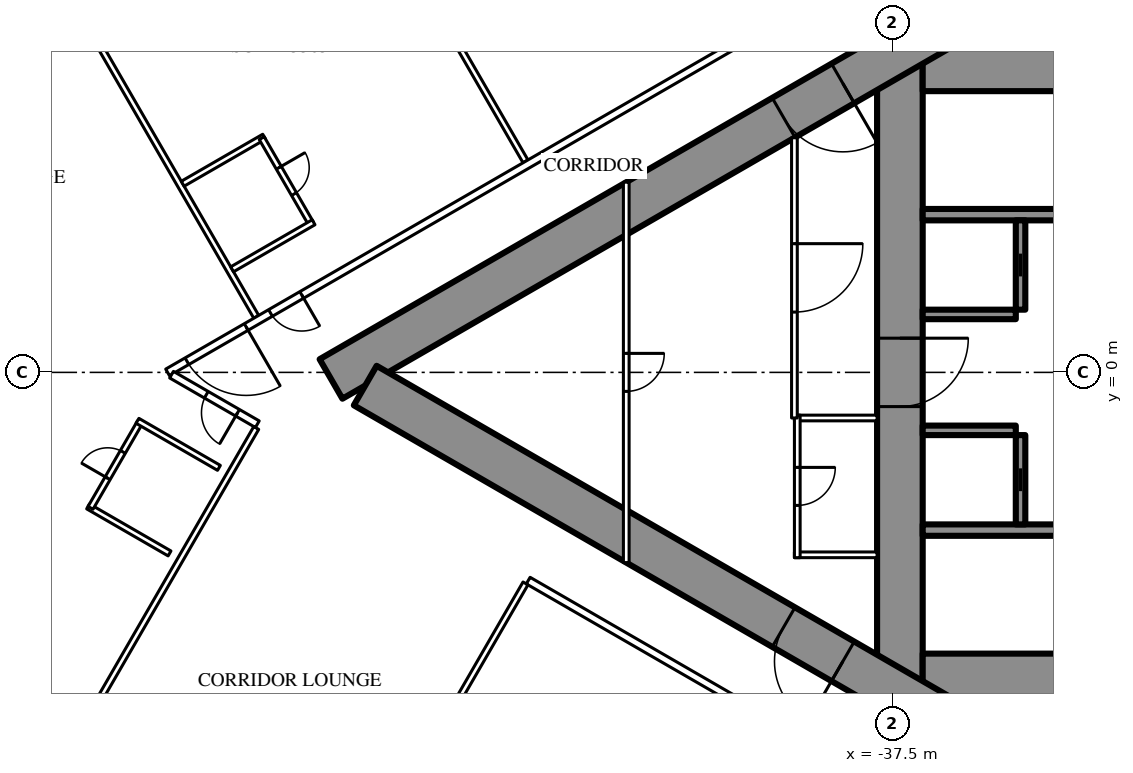
"""IFC4 building model, lengths in metres.
Left out: names, types, materials, properties, quantities, classifications, styles, units other than length and angle.
Written with IfcOpenShell. Run it as: python <this file> out.ifc"""

import sys

from ifc_helpers import new_model, si_unit, direction, frame, frame_2d, origin, place, context, subcontext, project, spatial, rectangle, extrude, element, fill, save


model = new_model("IFC4")
c1 = context("Model", 3, precision=1e-05, world=origin(), true_north=direction((0.0, 1.0)))
c2 = subcontext(c1, "Body", "Model", "MODEL_VIEW")
j1 = project(units=[si_unit("LENGTHUNIT", "METRE"), si_unit("PLANEANGLEUNIT", "RADIAN")], contexts=[c1])
p1 = place(None, origin())
s1 = spatial("IfcSite", under=j1, at=p1, CompositionType="ELEMENT")
p2 = place(p1, origin())
s2 = spatial("IfcBuilding", under=s1, at=p2, CompositionType="ELEMENT")
p3 = place(p2, frame((0.0, 0.0, 132.6)))
s3 = spatial("IfcBuildingStorey", under=s2, at=p3, CompositionType="ELEMENT", Elevation=132.6)
p4 = place(p3, frame((-37.3, 8.6, 0.0), z_axis=(0.0, 0.0, 1.0), x_axis=(0.0, -1.0, 0.0)))
e1 = element("IfcWall", 1, at=p4, inside=s3, PredefinedType="SHEAR", context=c2, shape_type="SweptSolid", body=[
    extrude(rectangle(XDim=17.2, YDim=1.2, at=frame_2d((8.6, 0.0))), origin(), (0.0, 0.0, 1.0), 3.5),
])
p5 = place(p4, frame((7.7, 0.0, 0.0)))
e2 = element("IfcOpeningElement", 2, at=p5, cuts=e1, PredefinedType="OPENING", context=c2, shape_type="SweptSolid", body=[
    extrude(rectangle(XDim=1.8, YDim=2.2, at=frame_2d((0.9, 1.1))), frame((0.0, 0.61, 0.0), z_axis=(0.0, -1.0, 0.0), x_axis=(1.0, 0.0, 0.0)), (0.0, 0.0, 1.0), 1.22),
])
p6 = place(p3, frame((-28.3, 8.0, 0.0), z_axis=(0.0, 0.0, 1.0), x_axis=(-1.0, 0.0, 0.0)))
e3 = element("IfcWall", 3, at=p6, inside=s3, PredefinedType="SHEAR", context=c2, shape_type="SweptSolid", body=[
    extrude(rectangle(XDim=8.4, YDim=1.2, at=frame_2d((4.2, 0.0))), origin(), (0.0, 0.0, 1.0), 3.5),
])
p7 = place(p6, frame((0.25, 0.0, 0.0)))
e4 = element("IfcOpeningElement", 4, at=p7, cuts=e3, PredefinedType="OPENING", context=c2, shape_type="SweptSolid", body=[
    extrude(rectangle(XDim=1.0, YDim=2.2, at=frame_2d((0.5, 1.1))), frame((0.0, 0.61, 0.0), z_axis=(0.0, -1.0, 0.0), x_axis=(1.0, 0.0, 0.0)), (0.0, 0.0, 1.0), 1.22),
])
p8 = place(p3, frame((-28.3, -8.0, 0.0), z_axis=(0.0, 0.0, 1.0), x_axis=(-1.0, 0.0, 0.0)))
e5 = element("IfcWall", 5, at=p8, inside=s3, PredefinedType="SHEAR", context=c2, shape_type="SweptSolid", body=[
    extrude(rectangle(XDim=8.4, YDim=1.2, at=frame_2d((4.2, 0.0))), origin(), (0.0, 0.0, 1.0), 3.5),
])
p9 = place(p8, frame((0.25, 0.0, 0.0)))
e6 = element("IfcOpeningElement", 6, at=p9, cuts=e5, PredefinedType="OPENING", context=c2, shape_type="SweptSolid", body=[
    extrude(rectangle(XDim=1.0, YDim=2.2, at=frame_2d((0.5, 1.1))), frame((0.0, 0.61, 0.0), z_axis=(0.0, -1.0, 0.0), x_axis=(1.0, 0.0, 0.0)), (0.0, 0.0, 1.0), 1.22),
])
for number, where, z_axis, x_axis in (
    (7, (-28.3, 4.15, 0.0), (0.0, 0.0, 1.0), (-1.0, 0.0, 0.0)),
    (8, (-28.3, -4.15, 0.0), (0.0, 0.0, 1.0), (-1.0, 0.0, 0.0)),
):
    element("IfcWall", number, at=place(p3, frame(where, z_axis=z_axis, x_axis=x_axis)), inside=s3, PredefinedType="SHEAR", context=c2, shape_type="SweptSolid", body=[
        extrude(rectangle(XDim=8.4, YDim=0.3, at=frame_2d((4.2, 0.0))), origin(), (0.0, 0.0, 1.0), 3.5),
    ])
p10 = place(p3, frame((-34.125, 4.0, 0.0), z_axis=(0.0, 0.0, 1.0), x_axis=(0.0, -1.0, 0.0)))
e9 = element("IfcWall", 9, at=p10, inside=s3, PredefinedType="SHEAR", context=c2, shape_type="SweptSolid", body=[
    extrude(rectangle(XDim=2.35, YDim=0.25, at=frame_2d((1.175, 0.0))), origin(), (0.0, 0.0, 1.0), 3.5),
])
p11 = place(p10, frame((0.875, 0.0, 0.0)))
e10 = element("IfcOpeningElement", 10, at=p11, cuts=e9, PredefinedType="OPENING", context=c2, shape_type="SweptSolid", body=[
    extrude(rectangle(XDim=0.6, YDim=2.0, at=frame_2d((0.3, 1.0))), frame((0.0, 0.135, 0.0), z_axis=(0.0, -1.0, 0.0), x_axis=(1.0, 0.0, 0.0)), (0.0, 0.0, 1.0), 0.27),
])
p12 = place(p3, frame((-34.25, 1.525, 0.0), z_axis=(0.0, 0.0, 1.0), x_axis=(-1.0, 0.0, 0.0)))
e11 = element("IfcWall", 11, at=p12, inside=s3, PredefinedType="SHEAR", context=c2, shape_type="SweptSolid", body=[
    extrude(rectangle(XDim=2.45, YDim=0.25, at=frame_2d((1.225, 0.0))), origin(), (0.0, 0.0, 1.0), 3.5),
])
p13 = place(p3, frame((-34.125, -1.65, 0.0), z_axis=(0.0, 0.0, 1.0), x_axis=(0.0, -1.0, 0.0)))
e12 = element("IfcWall", 12, at=p13, inside=s3, PredefinedType="SHEAR", context=c2, shape_type="SweptSolid", body=[
    extrude(rectangle(XDim=2.35, YDim=0.25, at=frame_2d((1.175, 0.0))), origin(), (0.0, 0.0, 1.0), 3.5),
])
p14 = place(p13, frame((0.875, 0.0, 0.0)))
e13 = element("IfcOpeningElement", 13, at=p14, cuts=e12, PredefinedType="OPENING", context=c2, shape_type="SweptSolid", body=[
    extrude(rectangle(XDim=0.6, YDim=2.0, at=frame_2d((0.3, 1.0))), frame((0.0, 0.135, 0.0), z_axis=(0.0, -1.0, 0.0), x_axis=(1.0, 0.0, 0.0)), (0.0, 0.0, 1.0), 0.27),
])
p15 = place(p3, frame((-34.25, -1.525, 0.0), z_axis=(0.0, 0.0, 1.0), x_axis=(-1.0, 0.0, 0.0)))
e14 = element("IfcWall", 14, at=p15, inside=s3, PredefinedType="SHEAR", context=c2, shape_type="SweptSolid", body=[
    extrude(rectangle(XDim=2.45, YDim=0.25, at=frame_2d((1.225, 0.0))), origin(), (0.0, 0.0, 1.0), 3.5),
])
p16 = place(p3, frame((-27.2, 14.3, 0.0), z_axis=(0.0, 0.0, 1.0), x_axis=(-0.866026593062, -0.499997940104, 0.0)))
e15 = element("IfcWall", 15, at=p16, inside=s3, PredefinedType="SHEAR", context=c2, shape_type="SweptSolid", body=[
    extrude(rectangle(XDim=28.946, YDim=1.2, at=frame_2d((14.473, 0.0))), origin(), (0.0, 0.0, 1.0), 3.5),
])
p17 = place(p16, frame((4.6, 0.0, 0.0)))
e16 = element("IfcOpeningElement", 16, at=p17, cuts=e15, PredefinedType="OPENING", context=c2, shape_type="SweptSolid", body=[
    extrude(rectangle(XDim=1.0, YDim=2.2, at=frame_2d((0.5, 1.1))), frame((0.0, 0.61, 0.0), z_axis=(0.0, -1.0, 0.0), x_axis=(1.0, 0.0, 0.0)), (0.0, 0.0, 1.0), 1.22),
])
p18 = place(p16, frame((13.395, 0.0, 0.0)))
e17 = element("IfcOpeningElement", 17, at=p18, cuts=e15, PredefinedType="OPENING", context=c2, shape_type="SweptSolid", body=[
    extrude(rectangle(XDim=1.8, YDim=2.2, at=frame_2d((0.9, 1.1))), frame((0.0, 0.61, 0.0), z_axis=(0.0, -1.0, 0.0), x_axis=(1.0, 0.0, 0.0)), (0.0, 0.0, 1.0), 1.22),
])
p19 = place(p3, frame((-27.2, -14.3, 0.0), z_axis=(0.0, 0.0, 1.0), x_axis=(-0.866024021859, 0.500002393557, 0.0)))
e18 = element("IfcWall", 18, at=p19, inside=s3, PredefinedType="SHEAR", context=c2, shape_type="SweptSolid", body=[
    extrude(rectangle(XDim=27.907, YDim=1.2, at=frame_2d((13.954, 0.0))), origin(), (0.0, 0.0, 1.0), 3.5),
])
p20 = place(p19, frame((4.6, 0.0, 0.0)))
e19 = element("IfcOpeningElement", 19, at=p20, cuts=e18, PredefinedType="OPENING", context=c2, shape_type="SweptSolid", body=[
    extrude(rectangle(XDim=1.0, YDim=2.2, at=frame_2d((0.5, 1.1))), frame((0.0, 0.61, 0.0), z_axis=(0.0, -1.0, 0.0), x_axis=(1.0, 0.0, 0.0)), (0.0, 0.0, 1.0), 1.22),
])
p21 = place(p19, frame((13.395, 0.0, 0.0)))
e20 = element("IfcOpeningElement", 20, at=p21, cuts=e18, PredefinedType="OPENING", context=c2, shape_type="SweptSolid", body=[
    extrude(rectangle(XDim=1.8, YDim=2.2, at=frame_2d((0.9, 1.1))), frame((0.0, 0.61, 0.0), z_axis=(0.0, -1.0, 0.0), x_axis=(1.0, 0.0, 0.0)), (0.0, 0.0, 1.0), 1.22),
])
p22 = place(p3, frame((-47.151, 5.552, 0.0), z_axis=(0.0, 0.0, 1.0), x_axis=(-0.500003012045, 0.866023664773, 0.0)))
e21 = element("IfcWall", 21, at=p22, inside=s3, PredefinedType="PARTITIONING", context=c2, shape_type="SweptSolid", body=[
    extrude(rectangle(XDim=8.311, YDim=0.15, at=frame_2d((4.156, 0.0))), origin(), (0.0, 0.0, 1.0), 2.2),
])
p23 = place(p3, frame((-54.236, 1.462, 0.0), z_axis=(0.0, 0.0, 1.0), x_axis=(-0.499990351854, 0.866030974073, 0.0)))
e22 = element("IfcWall", 22, at=p23, inside=s3, PredefinedType="PARTITIONING", context=c2, shape_type="SweptSolid", body=[
    extrude(rectangle(XDim=10.834, YDim=0.15, at=frame_2d((5.417, 0.0))), origin(), (0.0, 0.0, 1.0), 3.25),
])
p24 = place(p3, frame((-47.151, -5.552, 0.0), z_axis=(0.0, 0.0, 1.0), x_axis=(-0.500003012045, -0.866023664773, 0.0)))
e23 = element("IfcWall", 23, at=p24, inside=s3, PredefinedType="PARTITIONING", context=c2, shape_type="SweptSolid", body=[
    extrude(rectangle(XDim=8.311, YDim=0.15, at=frame_2d((4.156, 0.0))), origin(), (0.0, 0.0, 1.0), 2.2),
])
p25 = place(p3, frame((-54.236, -1.462, 0.0), z_axis=(0.0, 0.0, 1.0), x_axis=(-0.499990351854, -0.866030974073, 0.0)))
e24 = element("IfcWall", 24, at=p25, inside=s3, PredefinedType="PARTITIONING", context=c2, shape_type="SweptSolid", body=[
    extrude(rectangle(XDim=10.834, YDim=0.15, at=frame_2d((5.417, 0.0))), origin(), (0.0, 0.0, 1.0), 3.25),
])
p26 = place(p3, frame((-37.7, 10.894, 0.0), z_axis=(0.0, 0.0, 1.0), x_axis=(-0.866027905338, -0.499995667157, 0.0)))
e25 = element("IfcWall", 25, at=p26, inside=s3, PredefinedType="PARTITIONING", context=c2, shape_type="SweptSolid", body=[
    extrude(rectangle(XDim=21.787, YDim=0.2, at=frame_2d((10.894, 0.0))), origin(), (0.0, 0.0, 1.0), 3.25),
])
p27 = place(p26, frame((17.711, 0.0, 0.0)))
e26 = element("IfcOpeningElement", 26, at=p27, cuts=e25, PredefinedType="OPENING", context=c2, shape_type="SweptSolid", body=[
    extrude(rectangle(XDim=0.95, YDim=2.2, at=frame_2d((0.475, 1.1))), frame((0.0, 0.11, 0.0), z_axis=(0.0, -1.0, 0.0), x_axis=(1.0, 0.0, 0.0)), (0.0, 0.0, 1.0), 0.22),
])
p28 = place(p26, frame((19.399, 0.0, 0.0)))
e27 = element("IfcOpeningElement", 27, at=p28, cuts=e25, PredefinedType="OPENING", context=c2, shape_type="SweptSolid", body=[
    extrude(rectangle(XDim=1.8, YDim=2.2, at=frame_2d((0.9, 1.1))), frame((0.0, 0.11, 0.0), z_axis=(0.0, -1.0, 0.0), x_axis=(1.0, 0.0, 0.0)), (0.0, 0.0, 1.0), 0.22),
])
p29 = place(p26, frame((0.6, 0.0, 0.0)))
e28 = element("IfcOpeningElement", 28, at=p29, cuts=e25, PredefinedType="OPENING", context=c2, shape_type="SweptSolid", body=[
    extrude(rectangle(XDim=0.95, YDim=2.2, at=frame_2d((0.475, 1.1))), frame((0.0, 0.11, 0.0), z_axis=(0.0, -1.0, 0.0), x_axis=(1.0, 0.0, 0.0)), (0.0, 0.0, 1.0), 0.22),
])
p30 = place(p3, frame((-36.92, -11.344, 0.0), z_axis=(0.0, 0.0, 1.0), x_axis=(-0.866027897759, 0.499995680284, 0.0)))
e29 = element("IfcWall", 29, at=p30, inside=s3, PredefinedType="PARTITIONING", context=c2, shape_type="SweptSolid", body=[
    extrude(rectangle(XDim=11.731, YDim=0.2, at=frame_2d((5.865, 0.0))), origin(), (0.0, 0.0, 1.0), 3.25),
])
p31 = place(p30, frame((3.35, 0.0, 0.0)))
e30 = element("IfcOpeningElement", 30, at=p31, cuts=e29, PredefinedType="OPENING", context=c2, shape_type="SweptSolid", body=[
    extrude(rectangle(XDim=1.0, YDim=2.2, at=frame_2d((0.5, 1.1))), frame((0.0, 0.11, 0.0), z_axis=(0.0, -1.0, 0.0), x_axis=(1.0, 0.0, 0.0)), (0.0, 0.0, 1.0), 0.22),
])
p32 = place(p3, frame((-54.207, -1.363, 0.0), z_axis=(0.0, 0.0, 1.0), x_axis=(-0.866049872286, 0.499957616916, 0.0)))
e31 = element("IfcWall", 31, at=p32, inside=s3, PredefinedType="PARTITIONING", context=c2, shape_type="SweptSolid", body=[
    extrude(rectangle(XDim=2.606, YDim=0.2, at=frame_2d((1.303, 0.0))), origin(), (0.0, 0.0, 1.0), 3.25),
])
p33 = place(p32, frame((0.6, 0.0, 0.0)))
e32 = element("IfcOpeningElement", 32, at=p33, cuts=e31, PredefinedType="OPENING", context=c2, shape_type="SweptSolid", body=[
    extrude(rectangle(XDim=0.95, YDim=2.2, at=frame_2d((0.475, 1.1))), frame((0.0, 0.11, 0.0), z_axis=(0.0, -1.0, 0.0), x_axis=(1.0, 0.0, 0.0)), (0.0, 0.0, 1.0), 0.22),
])
p34 = place(p3, frame((-54.027, 6.201, 0.0), z_axis=(0.0, 0.0, 1.0), x_axis=(-0.866006523861, -0.500032699561, 0.0)))
e33 = element("IfcWall", 33, at=p34, inside=s3, PredefinedType="PARTITIONING", context=c2, shape_type="SweptSolid", body=[
    extrude(rectangle(XDim=2.475, YDim=0.15, at=frame_2d((1.237, 0.0))), origin(), (0.0, 0.0, 1.0), 3.25),
])
p35 = place(p3, frame((-52.792, 3.912, 0.0), z_axis=(0.0, 0.0, 1.0), x_axis=(-0.500006934395, 0.866021400173, 0.0)))
e34 = element("IfcWall", 34, at=p35, inside=s3, PredefinedType="PARTITIONING", context=c2, shape_type="SweptSolid", body=[
    extrude(rectangle(XDim=2.6, YDim=0.15, at=frame_2d((1.3, 0.0))), origin(), (0.0, 0.0, 1.0), 3.25),
])
p36 = place(p35, frame((0.9, 0.0, 0.0)))
e35 = element("IfcOpeningElement", 35, at=p36, cuts=e34, PredefinedType="OPENING", context=c2, shape_type="SweptSolid", body=[
    extrude(rectangle(XDim=0.8, YDim=2.2, at=frame_2d((0.4, 1.1))), frame((0.0, 0.085, 0.0), z_axis=(0.0, -1.0, 0.0), x_axis=(1.0, 0.0, 0.0)), (0.0, 0.0, 1.0), 0.17),
])
p37 = place(p3, frame((-52.727, 3.95, 0.0), z_axis=(0.0, 0.0, 1.0), x_axis=(-0.866006523861, -0.500032699561, 0.0)))
e36 = element("IfcWall", 36, at=p37, inside=s3, PredefinedType="PARTITIONING", context=c2, shape_type="SweptSolid", body=[
    extrude(rectangle(XDim=2.475, YDim=0.15, at=frame_2d((1.237, 0.0))), origin(), (0.0, 0.0, 1.0), 3.25),
])
p38 = place(p3, frame((-56.517, -4.764, 0.0), z_axis=(0.0, 0.0, 1.0), x_axis=(-0.866031185235, 0.4999899861, 0.0)))
e37 = element("IfcWall", 37, at=p38, inside=s3, PredefinedType="PARTITIONING", context=c2, shape_type="SweptSolid", body=[
    extrude(rectangle(XDim=2.475, YDim=0.15, at=frame_2d((1.238, 0.0))), origin(), (0.0, 0.0, 1.0), 3.25),
])
p39 = place(p3, frame((-57.296, -1.312, 0.0), z_axis=(0.0, 0.0, 1.0), x_axis=(-0.49997716683, -0.86603858612, 0.0)))
e38 = element("IfcWall", 38, at=p39, inside=s3, PredefinedType="PARTITIONING", context=c2, shape_type="SweptSolid", body=[
    extrude(rectangle(XDim=2.6, YDim=0.15, at=frame_2d((1.3, 0.0))), origin(), (0.0, 0.0, 1.0), 3.25),
])
p40 = place(p39, frame((0.9, 0.0, 0.0)))
e39 = element("IfcOpeningElement", 39, at=p40, cuts=e38, PredefinedType="OPENING", context=c2, shape_type="SweptSolid", body=[
    extrude(rectangle(XDim=0.8, YDim=2.2, at=frame_2d((0.4, 1.1))), frame((0.0, 0.085, 0.0), z_axis=(0.0, -1.0, 0.0), x_axis=(1.0, 0.0, 0.0)), (0.0, 0.0, 1.0), 0.17),
])
p41 = place(p3, frame((-55.217, -2.512, 0.0), z_axis=(0.0, 0.0, 1.0), x_axis=(-0.866031185235, 0.4999899861, 0.0)))
e40 = element("IfcWall", 40, at=p41, inside=s3, PredefinedType="PARTITIONING", context=c2, shape_type="SweptSolid", body=[
    extrude(rectangle(XDim=2.475, YDim=0.15, at=frame_2d((1.238, 0.0))), origin(), (0.0, 0.0, 1.0), 3.25),
])
for number, where, z_axis, x_axis in (
    (41, (-37.9, -1.2, 0.0), (0.0, 0.0, 1.0), (-1.0, 0.0, 0.0)),
    (42, (-37.9, -4.8, 0.0), (0.0, 0.0, 1.0), (-1.0, 0.0, 0.0)),
):
    element("IfcWall", number, at=place(p3, frame(where, z_axis=z_axis, x_axis=x_axis)), inside=s3, PredefinedType="PARTITIONING", context=c2, shape_type="SweptSolid", body=[
        extrude(rectangle(XDim=2.175, YDim=0.15, at=frame_2d((1.087, 0.0))), origin(), (0.0, 0.0, 1.0), 3.25),
    ])
p42 = place(p3, frame((-40.0, -1.125, 0.0), z_axis=(0.0, 0.0, 1.0), x_axis=(0.0, -1.0, 0.0)))
e43 = element("IfcWall", 43, at=p42, inside=s3, PredefinedType="PARTITIONING", context=c2, shape_type="SweptSolid", body=[
    extrude(rectangle(XDim=3.75, YDim=0.15, at=frame_2d((1.875, 0.0))), origin(), (0.0, 0.0, 1.0), 3.25),
])
p43 = place(p42, frame((1.375, 0.0, 0.0)))
e44 = element("IfcOpeningElement", 44, at=p43, cuts=e43, PredefinedType="OPENING", context=c2, shape_type="SweptSolid", body=[
    extrude(rectangle(XDim=1.0, YDim=2.2, at=frame_2d((0.5, 1.1))), frame((0.0, 0.085, 0.0), z_axis=(0.0, -1.0, 0.0), x_axis=(1.0, 0.0, 0.0)), (0.0, 0.0, 1.0), 0.17),
])
p44 = place(p3, frame((-40.075, 6.174, 0.0), z_axis=(0.0, 0.0, 1.0), x_axis=(0.0, -1.0, 0.0)))
e45 = element("IfcWall", 45, at=p44, inside=s3, PredefinedType="PARTITIONING", context=c2, shape_type="SweptSolid", body=[
    extrude(rectangle(XDim=7.374, YDim=0.15, at=frame_2d((3.687, 0.0))), origin(), (0.0, 0.0, 1.0), 3.25),
])
p45 = place(p44, frame((2.787, 0.0, 0.0)))
e46 = element("IfcOpeningElement", 46, at=p45, cuts=e45, PredefinedType="OPENING", context=c2, shape_type="SweptSolid", body=[
    extrude(rectangle(XDim=1.8, YDim=2.2, at=frame_2d((0.9, 1.1))), frame((0.0, 0.085, 0.0), z_axis=(0.0, -1.0, 0.0), x_axis=(1.0, 0.0, 0.0)), (0.0, 0.0, 1.0), 0.17),
])
p46 = place(p3, frame((-44.5, 5.005, 0.0), z_axis=(0.0, 0.0, 1.0), x_axis=(0.0, -1.0, 0.0)))
e47 = element("IfcWall", 47, at=p46, inside=s3, PredefinedType="PARTITIONING", context=c2, shape_type="SweptSolid", body=[
    extrude(rectangle(XDim=10.009, YDim=0.15, at=frame_2d((5.005, 0.0))), origin(), (0.0, 0.0, 1.0), 2.45),
])
p47 = place(p46, frame((4.505, 0.0, 0.0)))
e48 = element("IfcOpeningElement", 48, at=p47, cuts=e47, PredefinedType="OPENING", context=c2, shape_type="SweptSolid", body=[
    extrude(rectangle(XDim=1.0, YDim=2.2, at=frame_2d((0.5, 1.1))), frame((0.0, 0.085, 0.0), z_axis=(0.0, -1.0, 0.0), x_axis=(1.0, 0.0, 0.0)), (0.0, 0.0, 1.0), 0.17),
])
p48 = place(p36, origin())
e49 = element("IfcDoor", 49, at=p48, inside=s3, OperationType="SINGLE_SWING_RIGHT", PredefinedType="DOOR", context=c2, shape_type="SweptSolid", body=[
    extrude(rectangle(XDim=0.8, YDim=2.2, at=frame_2d((0.4, 1.1))), frame((0.0, 0.025, 0.0), z_axis=(0.0, -1.0, 0.0), x_axis=(1.0, 0.0, 0.0)), (0.0, 0.0, 1.0), 0.05),
])
fill(e35, e49)
p49 = place(p27, origin())
e50 = element("IfcDoor", 50, at=p49, inside=s3, OperationType="SINGLE_SWING_LEFT", PredefinedType="DOOR", context=c2, shape_type="SweptSolid", body=[
    extrude(rectangle(XDim=0.95, YDim=2.2, at=frame_2d((0.475, 1.1))), frame((0.0, 0.025, 0.0), z_axis=(0.0, -1.0, 0.0), x_axis=(1.0, 0.0, 0.0)), (0.0, 0.0, 1.0), 0.05),
])
fill(e26, e50)
p50 = place(p28, origin())
e51 = element("IfcDoor", 51, at=p50, inside=s3, OperationType="DOUBLE_DOOR_SINGLE_SWING", PredefinedType="DOOR", context=c2, shape_type="SweptSolid", body=[
    extrude(rectangle(XDim=1.8, YDim=2.2, at=frame_2d((0.9, 1.1))), frame((0.0, 0.025, 0.0), z_axis=(0.0, -1.0, 0.0), x_axis=(1.0, 0.0, 0.0)), (0.0, 0.0, 1.0), 0.05),
])
fill(e27, e51)
p51 = place(p40, origin())
e52 = element("IfcDoor", 52, at=p51, inside=s3, OperationType="SINGLE_SWING_RIGHT", PredefinedType="DOOR", context=c2, shape_type="SweptSolid", body=[
    extrude(rectangle(XDim=0.8, YDim=2.2, at=frame_2d((0.4, 1.1))), frame((0.0, 0.025, 0.0), z_axis=(0.0, -1.0, 0.0), x_axis=(1.0, 0.0, 0.0)), (0.0, 0.0, 1.0), 0.05),
])
fill(e39, e52)
p52 = place(p33, origin())
e53 = element("IfcDoor", 53, at=p52, inside=s3, OperationType="SINGLE_SWING_LEFT", PredefinedType="DOOR", context=c2, shape_type="SweptSolid", body=[
    extrude(rectangle(XDim=0.95, YDim=2.2, at=frame_2d((0.475, 1.1))), frame((0.0, 0.025, 0.0), z_axis=(0.0, -1.0, 0.0), x_axis=(1.0, 0.0, 0.0)), (0.0, 0.0, 1.0), 0.05),
])
fill(e32, e53)
p53 = place(p43, origin())
e54 = element("IfcDoor", 54, at=p53, inside=s3, OperationType="SINGLE_SWING_LEFT", PredefinedType="DOOR", context=c2, shape_type="SweptSolid", body=[
    extrude(rectangle(XDim=1.0, YDim=2.2, at=frame_2d((0.5, 1.1))), frame((0.0, 0.025, 0.0), z_axis=(0.0, -1.0, 0.0), x_axis=(1.0, 0.0, 0.0)), (0.0, 0.0, 1.0), 0.05),
])
fill(e44, e54)
p54 = place(p45, origin())
e55 = element("IfcDoor", 55, at=p54, inside=s3, OperationType="DOUBLE_DOOR_SINGLE_SWING", PredefinedType="DOOR", context=c2, shape_type="SweptSolid", body=[
    extrude(rectangle(XDim=1.8, YDim=2.2, at=frame_2d((0.9, 1.1))), frame((0.0, 0.025, 0.0), z_axis=(0.0, -1.0, 0.0), x_axis=(1.0, 0.0, 0.0)), (0.0, 0.0, 1.0), 0.05),
])
fill(e46, e55)
p55 = place(p47, origin())
e56 = element("IfcDoor", 56, at=p55, inside=s3, OperationType="SINGLE_SWING_LEFT", PredefinedType="DOOR", context=c2, shape_type="SweptSolid", body=[
    extrude(rectangle(XDim=1.0, YDim=2.2, at=frame_2d((0.5, 1.1))), frame((0.0, 0.025, 0.0), z_axis=(0.0, -1.0, 0.0), x_axis=(1.0, 0.0, 0.0)), (0.0, 0.0, 1.0), 0.05),
])
fill(e48, e56)
p56 = place(p18, origin())
e57 = element("IfcDoor", 57, at=p56, inside=s3, OperationType="DOUBLE_DOOR_SINGLE_SWING", PredefinedType="DOOR", context=c2, shape_type="SweptSolid", body=[
    extrude(rectangle(XDim=1.8, YDim=2.2, at=frame_2d((0.9, 1.1))), frame((0.0, 0.025, 0.0), z_axis=(0.0, -1.0, 0.0), x_axis=(1.0, 0.0, 0.0)), (0.0, 0.0, 1.0), 0.05),
])
fill(e17, e57)
p57 = place(p21, origin())
e58 = element("IfcDoor", 58, at=p57, inside=s3, OperationType="DOUBLE_DOOR_SINGLE_SWING", PredefinedType="DOOR", context=c2, shape_type="SweptSolid", body=[
    extrude(rectangle(XDim=1.8, YDim=2.2, at=frame_2d((0.9, 1.1))), frame((0.0, 0.025, 0.0), z_axis=(0.0, -1.0, 0.0), x_axis=(1.0, 0.0, 0.0)), (0.0, 0.0, 1.0), 0.05),
])
fill(e20, e58)
p58 = place(p5, origin())
e59 = element("IfcDoor", 59, at=p58, inside=s3, OperationType="DOUBLE_DOOR_SINGLE_SWING", PredefinedType="DOOR", context=c2, shape_type="SweptSolid", body=[
    extrude(rectangle(XDim=1.8, YDim=2.2, at=frame_2d((0.9, 1.1))), frame((0.0, 0.025, 0.0), z_axis=(0.0, -1.0, 0.0), x_axis=(1.0, 0.0, 0.0)), (0.0, 0.0, 1.0), 0.05),
])
fill(e2, e59)
p59 = place(p11, origin())
e60 = element("IfcDoor", 60, at=p59, inside=s3, OperationType="SLIDING_TO_LEFT", PredefinedType="DOOR", context=c2, shape_type="SweptSolid", body=[
    extrude(rectangle(XDim=0.6, YDim=2.0, at=frame_2d((0.3, 1.0))), frame((0.0, 0.025, 0.0), z_axis=(0.0, -1.0, 0.0), x_axis=(1.0, 0.0, 0.0)), (0.0, 0.0, 1.0), 0.05),
])
fill(e10, e60)
p60 = place(p14, origin())
e61 = element("IfcDoor", 61, at=p60, inside=s3, OperationType="SLIDING_TO_LEFT", PredefinedType="DOOR", context=c2, shape_type="SweptSolid", body=[
    extrude(rectangle(XDim=0.6, YDim=2.0, at=frame_2d((0.3, 1.0))), frame((0.0, 0.025, 0.0), z_axis=(0.0, -1.0, 0.0), x_axis=(1.0, 0.0, 0.0)), (0.0, 0.0, 1.0), 0.05),
])
fill(e13, e61)
save(model, sys.argv[1])
